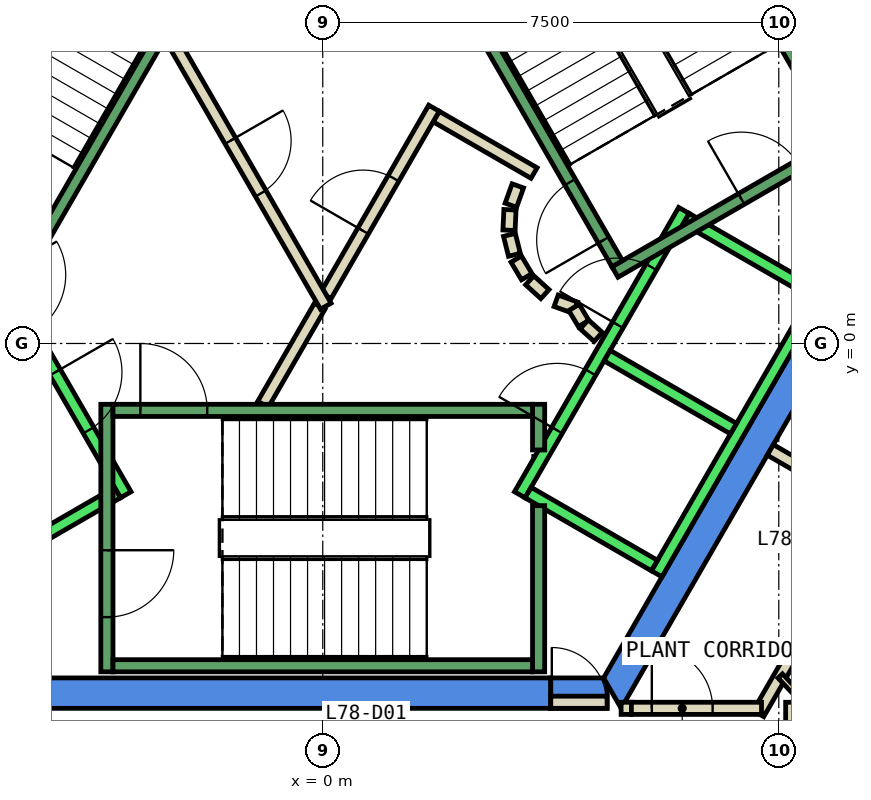
"""IFC4 building model, lengths in metres.
Left out: names, types, materials, properties, quantities, classifications, styles, units other than length and angle.
Written with IfcOpenShell. Run it as: python <this file> out.ifc"""

import sys

from ifc_helpers import new_model, si_unit, direction, frame, frame_2d, origin, place, context, subcontext, project, spatial, polyline, rectangle, outline, extrude, element, fill, save


model = new_model("IFC4")
c1 = context("Model", 3, precision=1e-05, world=origin(), true_north=direction((0.0, 1.0)))
c2 = subcontext(c1, "Body", "Model", "MODEL_VIEW")
j1 = project(units=[si_unit("LENGTHUNIT", "METRE"), si_unit("PLANEANGLEUNIT", "RADIAN")], contexts=[c1])
p1 = place(None, origin())
s1 = spatial("IfcSite", under=j1, at=p1, CompositionType="ELEMENT")
p2 = place(p1, origin())
s2 = spatial("IfcBuilding", under=s1, at=p2, CompositionType="ELEMENT")
p3 = place(p2, frame((0.0, 0.0, 331.4)))
s3 = spatial("IfcBuildingStorey", under=s2, at=p3, CompositionType="ELEMENT", Elevation=331.4)
p4 = place(p3, frame((0.0, 0.0, -0.45)))
e1 = element("IfcWall", 1, at=p4, inside=s3, PredefinedType="SHEAR", context=c2, shape_type="SweptSolid", body=[
    extrude(outline(polyline([(5.486, 9.998), (5.053, 9.748), (9.238, 2.5), (9.815, 2.5), (5.486, 9.998)])), origin(), (0.0, 0.0, 1.0), 4.6),
])
p5 = place(p3, frame((0.0, 0.0, -0.45)))
e2 = element("IfcWall", 2, at=p5, inside=s3, PredefinedType="SHEAR", context=c2, shape_type="SweptSolid", body=[
    extrude(outline(polyline([(3.75, -6.0), (3.75, -5.5), (-4.619, -5.5), (-4.907, -6.0), (3.75, -6.0)])), origin(), (0.0, 0.0, 1.0), 4.6),
])
p6 = place(p3, frame((0.0, 0.0, 3.6)))
e3 = element("IfcWall", 3, at=p6, inside=s3, PredefinedType="SHEAR", context=c2, shape_type="SweptSolid", body=[
    extrude(outline(polyline([(4.676, -6.0), (4.676, -5.6), (4.619, -5.5), (3.75, -5.5), (3.75, -6.0), (4.676, -6.0)])), origin(), (0.0, 0.0, 1.0), 0.55),
])
p7 = place(p3, frame((0.0, 0.0, -0.45)))
e4 = element("IfcWall", 4, at=p7, inside=s3, PredefinedType="SHEAR", context=c2, shape_type="SweptSolid", body=[
    extrude(outline(polyline([(4.907, -6.0), (9.815, 2.5), (9.238, 2.5), (4.619, -5.5), (4.907, -6.0)])), origin(), (0.0, 0.0, 1.0), 4.6),
])
p8 = place(p3, frame((-0.982, -1.0, 0.0), z_axis=(0.0, 0.0, 1.0), x_axis=(0.50024047865, 0.865886518847, 0.0)))
e5 = element("IfcWall", 5, at=p8, inside=s3, PredefinedType="PARTITIONING", context=c2, shape_type="SweptSolid", body=[
    extrude(rectangle(XDim=1.863, YDim=0.2, at=frame_2d((0.931, 0.0))), origin(), (0.0, 0.0, 1.0), 4.15),
])
p9 = place(p3, frame((1.866, 3.732, 0.0), z_axis=(0.0, 0.0, 1.0), x_axis=(0.866043361281, -0.499968895414, 0.0)))
e6 = element("IfcWall", 6, at=p9, inside=s3, PredefinedType="PARTITIONING", context=c2, shape_type="SweptSolid", body=[
    extrude(rectangle(XDim=1.858, YDim=0.2, at=frame_2d((0.929, 0.0))), origin(), (0.0, 0.0, 1.0), 4.15),
])
p10 = place(p3, frame((3.208, 2.592, 0.0), z_axis=(0.0, 0.0, 1.0), x_axis=(-0.337388820924, -0.941365382578, 0.0)))
e7 = element("IfcWall", 7, at=p10, inside=s3, PredefinedType="PARTITIONING", context=c2, shape_type="SweptSolid", body=[
    extrude(rectangle(XDim=0.338, YDim=0.2, at=frame_2d((0.169, 0.0))), origin(), (0.0, 0.0, 1.0), 4.15),
])
p11 = place(p3, frame((3.079, 2.199, 0.0), z_axis=(0.0, 0.0, 1.0), x_axis=(-0.047771483479, -0.998858290933, 0.0)))
e8 = element("IfcWall", 8, at=p11, inside=s3, PredefinedType="PARTITIONING", context=c2, shape_type="SweptSolid", body=[
    extrude(rectangle(XDim=0.337, YDim=0.2, at=frame_2d((0.169, 0.0))), origin(), (0.0, 0.0, 1.0), 4.15),
])
p12 = place(p3, frame((3.07, 1.786, 0.0), z_axis=(0.0, 0.0, 1.0), x_axis=(0.242705583207, -0.970099994784, 0.0)))
e9 = element("IfcWall", 9, at=p12, inside=s3, PredefinedType="PARTITIONING", context=c2, shape_type="SweptSolid", body=[
    extrude(rectangle(XDim=0.338, YDim=0.2, at=frame_2d((0.169, 0.0))), origin(), (0.0, 0.0, 1.0), 4.15),
])
for number, where, z_axis, x_axis in (
    (10, (3.182, 1.388, 0.0), (0.0, 0.0, 1.0), (0.512, -0.859, 0.0)),
    (11, (3.404, 1.039, 0.0), (0.0, 0.0, 1.0), (0.74, -0.672, 0.0)),
):
    element("IfcWall", number, at=place(p3, frame(where, z_axis=z_axis, x_axis=x_axis)), inside=s3, PredefinedType="PARTITIONING", context=c2, shape_type="SweptSolid", body=[
        extrude(rectangle(XDim=0.338, YDim=0.2, at=frame_2d((0.169, 0.0))), origin(), (0.0, 0.0, 1.0), 4.15),
    ])
p13 = place(p3, frame((3.838, 0.702, 0.0), z_axis=(0.0, 0.0, 1.0), x_axis=(0.941035081519, -0.338308993895, 0.0)))
e12 = element("IfcWall", 12, at=p13, inside=s3, PredefinedType="PARTITIONING", context=c2, shape_type="SweptSolid", body=[
    extrude(rectangle(XDim=0.337, YDim=0.2, at=frame_2d((0.168, 0.0))), origin(), (0.0, 0.0, 1.0), 4.15),
])
p14 = place(p3, frame((4.132, 0.593, 0.0), z_axis=(0.0, 0.0, 1.0), x_axis=(0.513561617048, -0.858052717201, 0.0)))
e13 = element("IfcWall", 13, at=p14, inside=s3, PredefinedType="PARTITIONING", context=c2, shape_type="SweptSolid", body=[
    extrude(rectangle(XDim=0.308, YDim=0.2, at=frame_2d((0.154, 0.0))), origin(), (0.0, 0.0, 1.0), 4.15),
])
p15 = place(p3, frame((4.301, 0.315, 0.0), z_axis=(0.0, 0.0, 1.0), x_axis=(0.741798017506, -0.670623367639, 0.0)))
e14 = element("IfcWall", 14, at=p15, inside=s3, PredefinedType="PARTITIONING", context=c2, shape_type="SweptSolid", body=[
    extrude(rectangle(XDim=0.309, YDim=0.2, at=frame_2d((0.154, 0.0))), origin(), (0.0, 0.0, 1.0), 4.15),
])
p16 = place(p3, frame((0.05, 0.787, 0.0), z_axis=(0.0, 0.0, 1.0), x_axis=(0.499954076797, 0.866051915934, 0.0)))
e15 = element("IfcWall", 15, at=p16, inside=s3, PredefinedType="PARTITIONING", context=c2, shape_type="SweptSolid", body=[
    extrude(rectangle(XDim=3.558, YDim=0.2, at=frame_2d((1.779, 0.0))), origin(), (0.0, 0.0, 1.0), 4.15),
])
p17 = place(p16, frame((1.229, 0.0, 0.0)))
e16 = element("IfcOpeningElement", 16, at=p17, cuts=e15, PredefinedType="OPENING", context=c2, shape_type="SweptSolid", body=[
    extrude(rectangle(XDim=1.0, YDim=2.1, at=frame_2d((0.5, 1.05))), frame((0.0, 0.11, 0.0), z_axis=(0.0, -1.0, 0.0), x_axis=(1.0, 0.0, 0.0)), (0.0, 0.0, 1.0), 0.22),
])
p18 = place(p3, frame((-2.54, 5.1, 0.0), z_axis=(0.0, 0.0, 1.0), x_axis=(0.499925051871, -0.866068670783, 0.0)))
e17 = element("IfcWall", 17, at=p18, inside=s3, PredefinedType="PARTITIONING", context=c2, shape_type="SweptSolid", body=[
    extrude(rectangle(XDim=5.181, YDim=0.2, at=frame_2d((2.59, 0.0))), origin(), (0.0, 0.0, 1.0), 4.15),
])
p19 = place(p18, frame((2.04, 0.0, 0.0)))
e18 = element("IfcOpeningElement", 18, at=p19, cuts=e17, PredefinedType="OPENING", context=c2, shape_type="SweptSolid", body=[
    extrude(rectangle(XDim=1.0, YDim=2.1, at=frame_2d((0.5, 1.05))), frame((0.0, 0.11, 0.0), z_axis=(0.0, -1.0, 0.0), x_axis=(1.0, 0.0, 0.0)), (0.0, 0.0, 1.0), 0.22),
])
p20 = place(p3, frame((0.713, -7.9, 0.0), z_axis=(0.0, 0.0, 1.0), x_axis=(0.0, 1.0, 0.0)))
e19 = element("IfcWall", 19, at=p20, inside=s3, PredefinedType="PARTITIONING", context=c2, shape_type="SweptSolid", body=[
    extrude(rectangle(XDim=1.9, YDim=0.2, at=frame_2d((0.95, 0.0))), origin(), (0.0, 0.0, 1.0), 4.15),
])
p21 = place(p20, frame((0.3, 0.0, 0.0)))
e20 = element("IfcOpeningElement", 20, at=p21, cuts=e19, PredefinedType="OPENING", context=c2, shape_type="SweptSolid", body=[
    extrude(rectangle(XDim=1.0, YDim=2.1, at=frame_2d((0.5, 1.05))), frame((0.0, 0.11, 0.0), z_axis=(0.0, -1.0, 0.0), x_axis=(1.0, 0.0, 0.0)), (0.0, 0.0, 1.0), 0.22),
])
p22 = place(p3, frame((4.907, -6.0, 0.0), z_axis=(0.0, 0.0, 1.0), x_axis=(1.0, 0.0, 0.0)))
e21 = element("IfcWall", 21, at=p22, inside=s3, PredefinedType="PARTITIONING", context=c2, shape_type="SweptSolid", body=[
    extrude(rectangle(XDim=0.169, YDim=0.2, at=frame_2d((0.084, 0.0))), origin(), (0.0, 0.0, 1.0), 2.4),
])
p23 = place(p3, frame((7.713, -5.9, 0.0), z_axis=(0.0, 0.0, 1.0), x_axis=(0.0, -1.0, 0.0)))
e22 = element("IfcWall", 22, at=p23, inside=s3, PredefinedType="PARTITIONING", context=c2, shape_type="SweptSolid", body=[
    extrude(rectangle(XDim=2.4, YDim=0.2, at=frame_2d((1.2, 0.0))), origin(), (0.0, 0.0, 1.0), 4.15),
])
p24 = place(p3, frame((9.106, -2.728, 0.0), z_axis=(0.0, 0.0, 1.0), x_axis=(-0.500132879116, -0.865948672398, 0.0)))
e23 = element("IfcWall", 23, at=p24, inside=s3, PredefinedType="PARTITIONING", context=c2, shape_type="SweptSolid", body=[
    extrude(rectangle(XDim=3.879, YDim=0.2, at=frame_2d((1.939, 0.0))), origin(), (0.0, 0.0, 1.0), 4.15),
])
p25 = place(p24, frame((1.083, 0.0, 0.0)))
e24 = element("IfcOpeningElement", 24, at=p25, cuts=e23, PredefinedType="OPENING", context=c2, shape_type="SweptSolid", body=[
    extrude(rectangle(XDim=1.0, YDim=2.1, at=frame_2d((0.5, 1.05))), frame((0.0, 0.11, 0.0), z_axis=(0.0, -1.0, 0.0), x_axis=(1.0, 0.0, 0.0)), (0.0, 0.0, 1.0), 0.22),
])
p26 = place(p3, frame((7.361, -1.75, 0.0), z_axis=(0.0, 0.0, 1.0), x_axis=(0.865980106173, -0.500078449558, 0.0)))
e25 = element("IfcWall", 25, at=p26, inside=s3, PredefinedType="PARTITIONING", context=c2, shape_type="SweptSolid", body=[
    extrude(rectangle(XDim=1.9, YDim=0.2, at=frame_2d((0.95, 0.0))), origin(), (0.0, 0.0, 1.0), 4.15),
])
p27 = place(p3, frame((7.524, -5.467, 0.0), z_axis=(0.0, 0.0, 1.0), x_axis=(0.686666158826, -0.726972892427, 0.0)))
e26 = element("IfcWall", 26, at=p27, inside=s3, PredefinedType="PARTITIONING", context=c2, shape_type="SweptSolid", body=[
    extrude(rectangle(XDim=13.622, YDim=0.1, at=frame_2d((6.811, 0.0))), origin(), (0.0, 0.0, 1.0), 4.15),
])
p28 = place(p3, frame((3.75, -5.9, 0.0), z_axis=(0.0, 0.0, 1.0), x_axis=(1.0, 0.0, 0.0)))
e27 = element("IfcWall", 27, at=p28, inside=s3, PredefinedType="PARTITIONING", context=c2, shape_type="SweptSolid", body=[
    extrude(rectangle(XDim=0.926, YDim=0.2, at=frame_2d((0.463, 0.0))), origin(), (0.0, 0.0, 1.0), 2.4),
])
p29 = place(p28, frame((0.017, 0.0, 0.0)))
e28 = element("IfcOpeningElement", 28, at=p29, cuts=e27, PredefinedType="OPENING", context=c2, shape_type="SweptSolid", body=[
    extrude(rectangle(XDim=0.9, YDim=2.1, at=frame_2d((0.45, 1.05))), frame((0.0, 0.11, 0.0), z_axis=(0.0, -1.0, 0.0), x_axis=(1.0, 0.0, 0.0)), (0.0, 0.0, 1.0), 0.22),
])
p30 = place(p3, frame((5.076, -6.0, 0.0), z_axis=(0.0, 0.0, 1.0), x_axis=(1.0, 0.0, 0.0)))
e29 = element("IfcWall", 29, at=p30, inside=s3, PredefinedType="PARTITIONING", context=c2, shape_type="SweptSolid", body=[
    extrude(rectangle(XDim=2.14, YDim=0.2, at=frame_2d((1.07, 0.0))), origin(), (0.0, 0.0, 1.0), 4.15),
])
p31 = place(p30, frame((0.336, 0.0, 0.0)))
e30 = element("IfcOpeningElement", 30, at=p31, cuts=e29, PredefinedType="OPENING", context=c2, shape_type="SweptSolid", body=[
    extrude(rectangle(XDim=1.0, YDim=2.1, at=frame_2d((0.5, 1.05))), frame((0.0, 0.11, 0.0), z_axis=(0.0, -1.0, 0.0), x_axis=(1.0, 0.0, 0.0)), (0.0, 0.0, 1.0), 0.22),
])
p32 = place(p3, frame((-5.94, 2.188, 0.0), z_axis=(0.0, 0.0, 1.0), x_axis=(0.500034260056, -0.866005622828, 0.0)))
e31 = element("IfcWall", 31, at=p32, inside=s3, PredefinedType="STANDARD", context=c2, shape_type="SweptSolid", body=[
    extrude(rectangle(XDim=5.399, YDim=0.2, at=frame_2d((2.7, 0.0))), origin(), (0.0, 0.0, 1.0), 4.15),
])
p33 = place(p32, frame((3.075, 0.0, 0.0)))
e32 = element("IfcOpeningElement", 32, at=p33, cuts=e31, PredefinedType="OPENING", context=c2, shape_type="SweptSolid", body=[
    extrude(rectangle(XDim=1.1, YDim=2.1, at=frame_2d((0.55, 1.05))), frame((0.0, 0.11, 0.0), z_axis=(0.0, -1.0, 0.0), x_axis=(1.0, 0.0, 0.0)), (0.0, 0.0, 1.0), 0.22),
])
p34 = place(p32, frame((1.225, 0.0, 0.0)))
e33 = element("IfcOpeningElement", 33, at=p34, cuts=e31, PredefinedType="OPENING", context=c2, shape_type="SweptSolid", body=[
    extrude(rectangle(XDim=1.1, YDim=2.1, at=frame_2d((0.55, 1.05))), frame((0.0, 0.11, 0.0), z_axis=(0.0, -1.0, 0.0), x_axis=(1.0, 0.0, 0.0)), (0.0, 0.0, 1.0), 0.22),
])
p35 = place(p3, frame((-3.377, -2.452, 0.0), z_axis=(0.0, 0.0, 1.0), x_axis=(-0.865955154139, -0.50012165622, 0.0)))
e34 = element("IfcWall", 34, at=p35, inside=s3, PredefinedType="STANDARD", context=c2, shape_type="SweptSolid", body=[
    extrude(rectangle(XDim=2.4, YDim=0.2, at=frame_2d((1.2, 0.0))), origin(), (0.0, 0.0, 1.0), 4.15),
])
p36 = place(p3, frame((3.24, -2.488, 0.0), z_axis=(0.0, 0.0, 1.0), x_axis=(0.500034260056, 0.866005622828, 0.0)))
e35 = element("IfcWall", 35, at=p36, inside=s3, PredefinedType="STANDARD", context=c2, shape_type="SweptSolid", body=[
    extrude(rectangle(XDim=5.399, YDim=0.2, at=frame_2d((2.7, 0.0))), origin(), (0.0, 0.0, 1.0), 4.15),
])
p37 = place(p36, frame((3.225, 0.0, 0.0)))
e36 = element("IfcOpeningElement", 36, at=p37, cuts=e35, PredefinedType="OPENING", context=c2, shape_type="SweptSolid", body=[
    extrude(rectangle(XDim=1.1, YDim=2.1, at=frame_2d((0.55, 1.05))), frame((0.0, 0.11, 0.0), z_axis=(0.0, -1.0, 0.0), x_axis=(1.0, 0.0, 0.0)), (0.0, 0.0, 1.0), 0.22),
])
p38 = place(p36, frame((1.225, 0.0, 0.0)))
e37 = element("IfcOpeningElement", 37, at=p38, cuts=e35, PredefinedType="OPENING", context=c2, shape_type="SweptSolid", body=[
    extrude(rectangle(XDim=1.1, YDim=2.1, at=frame_2d((0.55, 1.05))), frame((0.0, 0.11, 0.0), z_axis=(0.0, -1.0, 0.0), x_axis=(1.0, 0.0, 0.0)), (0.0, 0.0, 1.0), 0.22),
])
p39 = place(p3, frame((5.492, -3.788, 0.0), z_axis=(0.0, 0.0, 1.0), x_axis=(0.500034260056, 0.866005622828, 0.0)))
e38 = element("IfcWall", 38, at=p39, inside=s3, PredefinedType="STANDARD", context=c2, shape_type="SweptSolid", body=[
    extrude(rectangle(XDim=5.399, YDim=0.2, at=frame_2d((2.7, 0.0))), origin(), (0.0, 0.0, 1.0), 4.15),
])
p40 = place(p3, frame((3.377, -2.452, 0.0), z_axis=(0.0, 0.0, 1.0), x_axis=(0.865955154139, -0.50012165622, 0.0)))
e39 = element("IfcWall", 39, at=p40, inside=s3, PredefinedType="STANDARD", context=c2, shape_type="SweptSolid", body=[
    extrude(rectangle(XDim=2.4, YDim=0.2, at=frame_2d((1.2, 0.0))), origin(), (0.0, 0.0, 1.0), 4.15),
])
for number, where, z_axis, x_axis in (
    (40, (4.677, -0.2, 0.0), (0.0, 0.0, 1.0), (0.866, -0.5, 0.0)),
    (41, (5.977, 2.052, 0.0), (0.0, 0.0, 1.0), (0.866, -0.5, 0.0)),
):
    element("IfcWall", number, at=place(p3, frame(where, z_axis=z_axis, x_axis=x_axis)), inside=s3, PredefinedType="STANDARD", context=c2, shape_type="SweptSolid", body=[
        extrude(rectangle(XDim=2.399, YDim=0.2, at=frame_2d((1.2, 0.0))), origin(), (0.0, 0.0, 1.0), 4.15),
    ])
p41 = place(p3, frame((-3.55, -1.0, 0.0), z_axis=(0.0, 0.0, 1.0), x_axis=(0.0, -1.0, 0.0)))
e42 = element("IfcWall", 42, at=p41, inside=s3, PredefinedType="STANDARD", context=c2, shape_type="SweptSolid", body=[
    extrude(rectangle(XDim=4.4, YDim=0.2, at=frame_2d((2.2, 0.0))), origin(), (0.0, 0.0, 1.0), 4.15),
])
p42 = place(p41, frame((2.4, 0.0, 0.0)))
e43 = element("IfcOpeningElement", 43, at=p42, cuts=e42, PredefinedType="OPENING", context=c2, shape_type="SweptSolid", body=[
    extrude(rectangle(XDim=1.1, YDim=2.2, at=frame_2d((0.55, 1.1))), frame((0.0, 0.11, 0.0), z_axis=(0.0, -1.0, 0.0), x_axis=(1.0, 0.0, 0.0)), (0.0, 0.0, 1.0), 0.22),
])
p43 = place(p3, frame((3.55, -2.667, 0.0), z_axis=(0.0, 0.0, 1.0), x_axis=(0.0, -1.0, 0.0)))
e44 = element("IfcWall", 44, at=p43, inside=s3, PredefinedType="STANDARD", context=c2, shape_type="SweptSolid", body=[
    extrude(rectangle(XDim=2.733, YDim=0.2, at=frame_2d((1.366, 0.0))), origin(), (0.0, 0.0, 1.0), 4.15),
])
p44 = place(p3, frame((3.55, -1.0, 0.0), z_axis=(0.0, 0.0, 1.0), x_axis=(0.0, -1.0, 0.0)))
e45 = element("IfcWall", 45, at=p44, inside=s3, PredefinedType="STANDARD", context=c2, shape_type="SweptSolid", body=[
    extrude(rectangle(XDim=0.751, YDim=0.2, at=frame_2d((0.375, 0.0))), origin(), (0.0, 0.0, 1.0), 4.15),
])
p45 = place(p3, frame((-3.45, -1.1, 0.0), z_axis=(0.0, 0.0, 1.0), x_axis=(1.0, 0.0, 0.0)))
e46 = element("IfcWall", 46, at=p45, inside=s3, PredefinedType="STANDARD", context=c2, shape_type="SweptSolid", body=[
    extrude(rectangle(XDim=6.9, YDim=0.2, at=frame_2d((3.45, 0.0))), origin(), (0.0, 0.0, 1.0), 4.15),
])
p46 = place(p45, frame((0.45, 0.0, 0.0)))
e47 = element("IfcOpeningElement", 47, at=p46, cuts=e46, PredefinedType="OPENING", context=c2, shape_type="SweptSolid", body=[
    extrude(rectangle(XDim=1.1, YDim=2.2, at=frame_2d((0.55, 1.1))), frame((0.0, 0.11, 0.0), z_axis=(0.0, -1.0, 0.0), x_axis=(1.0, 0.0, 0.0)), (0.0, 0.0, 1.0), 0.22),
])
p47 = place(p3, frame((-3.45, -5.3, 0.0), z_axis=(0.0, 0.0, 1.0), x_axis=(1.0, 0.0, 0.0)))
e48 = element("IfcWall", 48, at=p47, inside=s3, PredefinedType="STANDARD", context=c2, shape_type="SweptSolid", body=[
    extrude(rectangle(XDim=6.9, YDim=0.2, at=frame_2d((3.45, 0.0))), origin(), (0.0, 0.0, 1.0), 4.15),
])
p48 = place(p3, frame((4.806, 1.176, 0.0), z_axis=(0.0, 0.0, 1.0), x_axis=(0.866059941101, 0.499940174841, 0.0)))
e49 = element("IfcWall", 49, at=p48, inside=s3, PredefinedType="STANDARD", context=c2, shape_type="SweptSolid", body=[
    extrude(rectangle(XDim=4.4, YDim=0.2, at=frame_2d((2.2, 0.0))), origin(), (0.0, 0.0, 1.0), 4.15),
])
p49 = place(p48, frame((2.4, 0.0, 0.0)))
e50 = element("IfcOpeningElement", 50, at=p49, cuts=e49, PredefinedType="OPENING", context=c2, shape_type="SweptSolid", body=[
    extrude(rectangle(XDim=1.1, YDim=2.2, at=frame_2d((0.55, 1.1))), frame((0.0, 0.11, 0.0), z_axis=(0.0, -1.0, 0.0), x_axis=(1.0, 0.0, 0.0)), (0.0, 0.0, 1.0), 0.22),
])
p50 = place(p3, frame((4.843, 1.312, 0.0), z_axis=(0.0, 0.0, 1.0), x_axis=(-0.499963383562, 0.866046543262, 0.0)))
e51 = element("IfcWall", 51, at=p50, inside=s3, PredefinedType="STANDARD", context=c2, shape_type="SweptSolid", body=[
    extrude(rectangle(XDim=6.9, YDim=0.2, at=frame_2d((3.45, 0.0))), origin(), (0.0, 0.0, 1.0), 4.15),
])
p51 = place(p50, frame((0.45, 0.0, 0.0)))
e52 = element("IfcOpeningElement", 52, at=p51, cuts=e51, PredefinedType="OPENING", context=c2, shape_type="SweptSolid", body=[
    extrude(rectangle(XDim=1.1, YDim=2.2, at=frame_2d((0.55, 1.1))), frame((0.0, 0.11, 0.0), z_axis=(0.0, -1.0, 0.0), x_axis=(1.0, 0.0, 0.0)), (0.0, 0.0, 1.0), 0.22),
])
p52 = place(p3, frame((8.48, 3.412, 0.0), z_axis=(0.0, 0.0, 1.0), x_axis=(-0.499978703459, 0.866037698999, 0.0)))
e53 = element("IfcWall", 53, at=p52, inside=s3, PredefinedType="STANDARD", context=c2, shape_type="SweptSolid", body=[
    extrude(rectangle(XDim=6.9, YDim=0.2, at=frame_2d((3.45, 0.0))), origin(), (0.0, 0.0, 1.0), 4.15),
])
p53 = place(p3, frame((-1.393, 7.288, 0.0), z_axis=(0.0, 0.0, 1.0), x_axis=(-0.499963383562, -0.866046543262, 0.0)))
e54 = element("IfcWall", 54, at=p53, inside=s3, PredefinedType="STANDARD", context=c2, shape_type="SweptSolid", body=[
    extrude(rectangle(XDim=6.9, YDim=0.2, at=frame_2d((3.45, 0.0))), origin(), (0.0, 0.0, 1.0), 4.15),
])
p54 = place(p53, frame((0.45, 0.0, 0.0)))
e55 = element("IfcOpeningElement", 55, at=p54, cuts=e54, PredefinedType="OPENING", context=c2, shape_type="SweptSolid", body=[
    extrude(rectangle(XDim=1.1, YDim=2.2, at=frame_2d((0.55, 1.1))), frame((0.0, 0.11, 0.0), z_axis=(0.0, -1.0, 0.0), x_axis=(1.0, 0.0, 0.0)), (0.0, 0.0, 1.0), 0.22),
])
p55 = place(p31, origin())
e56 = element("IfcDoor", 56, at=p55, inside=s3, OperationType="SINGLE_SWING_RIGHT", PredefinedType="DOOR", context=c2, shape_type="SweptSolid", body=[
    extrude(rectangle(XDim=1.0, YDim=2.1, at=frame_2d((0.5, 1.05))), frame((0.0, 0.025, 0.0), z_axis=(0.0, -1.0, 0.0), x_axis=(1.0, 0.0, 0.0)), (0.0, 0.0, 1.0), 0.05),
])
fill(e30, e56)
p56 = place(p17, origin())
e57 = element("IfcDoor", 57, at=p56, inside=s3, OperationType="SINGLE_SWING_RIGHT", PredefinedType="DOOR", context=c2, shape_type="SweptSolid", body=[
    extrude(rectangle(XDim=1.0, YDim=2.1, at=frame_2d((0.5, 1.05))), frame((0.0, 0.025, 0.0), z_axis=(0.0, -1.0, 0.0), x_axis=(1.0, 0.0, 0.0)), (0.0, 0.0, 1.0), 0.05),
])
fill(e16, e57)
p57 = place(p19, origin())
e58 = element("IfcDoor", 58, at=p57, inside=s3, OperationType="SINGLE_SWING_RIGHT", PredefinedType="DOOR", context=c2, shape_type="SweptSolid", body=[
    extrude(rectangle(XDim=1.0, YDim=2.1, at=frame_2d((0.5, 1.05))), frame((0.0, 0.025, 0.0), z_axis=(0.0, -1.0, 0.0), x_axis=(1.0, 0.0, 0.0)), (0.0, 0.0, 1.0), 0.05),
])
fill(e18, e58)
p58 = place(p29, origin())
e59 = element("IfcDoor", 59, at=p58, inside=s3, OperationType="SINGLE_SWING_LEFT", PredefinedType="DOOR", context=c2, shape_type="SweptSolid", body=[
    extrude(rectangle(XDim=0.9, YDim=2.1, at=frame_2d((0.45, 1.05))), frame((0.0, 0.025, 0.0), z_axis=(0.0, -1.0, 0.0), x_axis=(1.0, 0.0, 0.0)), (0.0, 0.0, 1.0), 0.05),
])
fill(e28, e59)
p59 = place(p37, origin())
e60 = element("IfcDoor", 60, at=p59, inside=s3, OperationType="SLIDING_TO_LEFT", PredefinedType="DOOR", context=c2, shape_type="SweptSolid", body=[
    extrude(rectangle(XDim=1.1, YDim=2.1, at=frame_2d((0.55, 1.05))), frame((0.0, 0.025, 0.0), z_axis=(0.0, -1.0, 0.0), x_axis=(1.0, 0.0, 0.0)), (0.0, 0.0, 1.0), 0.05),
])
fill(e36, e60)
p60 = place(p33, origin())
e61 = element("IfcDoor", 61, at=p60, inside=s3, OperationType="SLIDING_TO_LEFT", PredefinedType="DOOR", context=c2, shape_type="SweptSolid", body=[
    extrude(rectangle(XDim=1.1, YDim=2.1, at=frame_2d((0.55, 1.05))), frame((0.0, 0.025, 0.0), z_axis=(0.0, -1.0, 0.0), x_axis=(1.0, 0.0, 0.0)), (0.0, 0.0, 1.0), 0.05),
])
fill(e32, e61)
p61 = place(p38, origin())
e62 = element("IfcDoor", 62, at=p61, inside=s3, OperationType="SLIDING_TO_LEFT", PredefinedType="DOOR", context=c2, shape_type="SweptSolid", body=[
    extrude(rectangle(XDim=1.1, YDim=2.1, at=frame_2d((0.55, 1.05))), frame((0.0, 0.025, 0.0), z_axis=(0.0, -1.0, 0.0), x_axis=(1.0, 0.0, 0.0)), (0.0, 0.0, 1.0), 0.05),
])
fill(e37, e62)
p62 = place(p46, origin())
e63 = element("IfcDoor", 63, at=p62, inside=s3, OperationType="SINGLE_SWING_LEFT", PredefinedType="DOOR", context=c2, shape_type="SweptSolid", body=[
    extrude(rectangle(XDim=1.1, YDim=2.2, at=frame_2d((0.55, 1.1))), frame((0.0, 0.025, 0.0), z_axis=(0.0, -1.0, 0.0), x_axis=(1.0, 0.0, 0.0)), (0.0, 0.0, 1.0), 0.05),
])
fill(e47, e63)
p63 = place(p42, origin())
e64 = element("IfcDoor", 64, at=p63, inside=s3, OperationType="SINGLE_SWING_LEFT", PredefinedType="DOOR", context=c2, shape_type="SweptSolid", body=[
    extrude(rectangle(XDim=1.1, YDim=2.2, at=frame_2d((0.55, 1.1))), frame((0.0, 0.025, 0.0), z_axis=(0.0, -1.0, 0.0), x_axis=(1.0, 0.0, 0.0)), (0.0, 0.0, 1.0), 0.05),
])
fill(e43, e64)
p64 = place(p51, origin())
e65 = element("IfcDoor", 65, at=p64, inside=s3, OperationType="SINGLE_SWING_LEFT", PredefinedType="DOOR", context=c2, shape_type="SweptSolid", body=[
    extrude(rectangle(XDim=1.1, YDim=2.2, at=frame_2d((0.55, 1.1))), frame((0.0, 0.025, 0.0), z_axis=(0.0, -1.0, 0.0), x_axis=(1.0, 0.0, 0.0)), (0.0, 0.0, 1.0), 0.05),
])
fill(e52, e65)
p65 = place(p49, origin())
e66 = element("IfcDoor", 66, at=p65, inside=s3, OperationType="SINGLE_SWING_LEFT", PredefinedType="DOOR", context=c2, shape_type="SweptSolid", body=[
    extrude(rectangle(XDim=1.1, YDim=2.2, at=frame_2d((0.55, 1.1))), frame((0.0, 0.025, 0.0), z_axis=(0.0, -1.0, 0.0), x_axis=(1.0, 0.0, 0.0)), (0.0, 0.0, 1.0), 0.05),
])
fill(e50, e66)
save(model, sys.argv[1])
